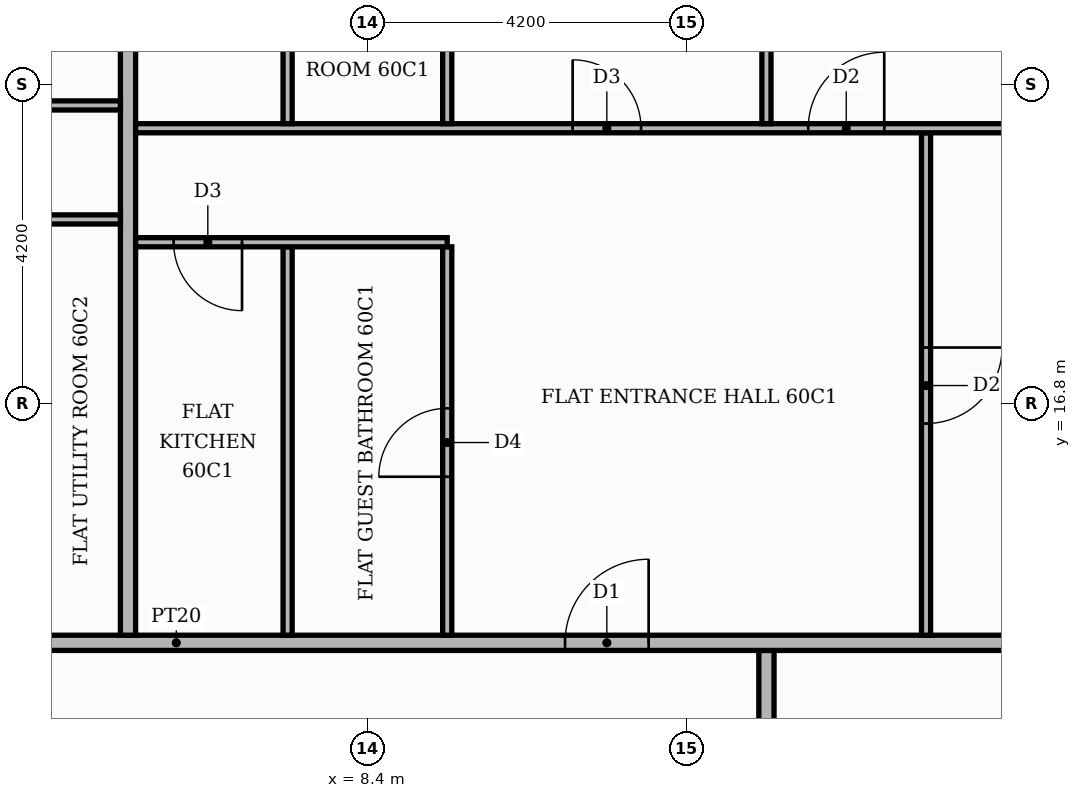
"""IFC4 building model, lengths in metres.
Left out: names, types, materials, properties, quantities, classifications, styles, units other than length and angle.
Written with IfcOpenShell. Run it as: python <this file> out.ifc"""

import sys

from ifc_helpers import new_model, si_unit, direction, frame, frame_2d, origin, place, context, subcontext, project, spatial, rectangle, extrude, element, fill, save


model = new_model("IFC4")
c1 = context("Model", 3, precision=1e-05, world=origin(), true_north=direction((0.0, 1.0)))
c2 = subcontext(c1, "Body", "Model", "MODEL_VIEW")
j1 = project(units=[si_unit("LENGTHUNIT", "METRE"), si_unit("PLANEANGLEUNIT", "RADIAN")], contexts=[c1])
p1 = place(None, origin())
s1 = spatial("IfcSite", under=j1, at=p1, CompositionType="ELEMENT")
p2 = place(p1, origin())
s2 = spatial("IfcBuilding", under=s1, at=p2, CompositionType="ELEMENT")
p3 = place(p2, frame((0.0, 0.0, 252.3)))
s3 = spatial("IfcBuildingStorey", under=s2, at=p3, CompositionType="ELEMENT", Elevation=252.3)
p4 = place(p3, frame((13.65, 11.1, 0.0), z_axis=(0.0, 0.0, 1.0), x_axis=(0.0, 1.0, 0.0)))
e1 = element("IfcWall", 1, at=p4, inside=s3, PredefinedType="PARTITIONING", context=c2, shape_type="SweptSolid", body=[
    extrude(rectangle(XDim=2.45, YDim=0.2, at=frame_2d((1.225, 0.0))), origin(), (0.0, 0.0, 1.0), 3.48),
])
p5 = place(p3, frame((-13.65, 13.65, 0.0), z_axis=(0.0, 0.0, 1.0), x_axis=(1.0, 0.0, 0.0)))
e2 = element("IfcWall", 2, at=p5, inside=s3, PredefinedType="PARTITIONING", context=c2, shape_type="SweptSolid", body=[
    extrude(rectangle(XDim=39.07, YDim=0.2, at=frame_2d((19.535, 0.0))), origin(), (0.0, 0.0, 1.0), 3.48),
])
p6 = place(p5, frame((24.65, 0.0, 0.0)))
e3 = element("IfcOpeningElement", 3, at=p6, cuts=e2, PredefinedType="OPENING", context=c2, shape_type="SweptSolid", body=[
    extrude(rectangle(XDim=1.1, YDim=2.4, at=frame_2d((0.55, 1.2))), frame((0.0, 0.11, 0.0), z_axis=(0.0, -1.0, 0.0), x_axis=(1.0, 0.0, 0.0)), (0.0, 0.0, 1.0), 0.22),
])
p7 = place(p5, frame((14.15, 0.0, 0.0)))
e4 = element("IfcOpeningElement", 4, at=p7, cuts=e2, PredefinedType="OPENING", context=c2, shape_type="SweptSolid", body=[
    extrude(rectangle(XDim=1.1, YDim=2.4, at=frame_2d((0.55, 1.2))), frame((0.0, 0.11, 0.0), z_axis=(0.0, -1.0, 0.0), x_axis=(1.0, 0.0, 0.0)), (0.0, 0.0, 1.0), 0.22),
])
p8 = place(p3, frame((5.25, 13.75, 0.0), z_axis=(0.0, 0.0, 1.0), x_axis=(0.0, 1.0, 0.0)))
e5 = element("IfcWall", 5, at=p8, inside=s3, PredefinedType="PARTITIONING", context=c2, shape_type="SweptSolid", body=[
    extrude(rectangle(XDim=11.67, YDim=0.2, at=frame_2d((5.835, 0.0))), origin(), (0.0, 0.0, 1.0), 3.48),
])
p9 = place(p3, frame((7.35, 13.75, 0.0), z_axis=(0.0, 0.0, 1.0), x_axis=(0.0, 1.0, 0.0)))
e6 = element("IfcWall", 6, at=p9, inside=s3, PredefinedType="PARTITIONING", context=c2, shape_type="SweptSolid", body=[
    extrude(rectangle(XDim=5.11, YDim=0.12, at=frame_2d((2.555, 0.0))), origin(), (0.0, 0.0, 1.0), 3.48),
])
p10 = place(p3, frame((9.45, 13.75, 0.0), z_axis=(0.0, 0.0, 1.0), x_axis=(0.0, 1.0, 0.0)))
e7 = element("IfcWall", 7, at=p10, inside=s3, PredefinedType="PARTITIONING", context=c2, shape_type="SweptSolid", body=[
    extrude(rectangle(XDim=5.11, YDim=0.12, at=frame_2d((2.555, 0.0))), origin(), (0.0, 0.0, 1.0), 3.48),
])
p11 = place(p10, frame((2.085, 0.0, 0.0)))
e8 = element("IfcOpeningElement", 8, at=p11, cuts=e7, PredefinedType="OPENING", context=c2, shape_type="SweptSolid", body=[
    extrude(rectangle(XDim=0.9, YDim=2.1, at=frame_2d((0.45, 1.05))), frame((0.0, 0.07, 0.0), z_axis=(0.0, -1.0, 0.0), x_axis=(1.0, 0.0, 0.0)), (0.0, 0.0, 1.0), 0.14),
])
p12 = place(p3, frame((15.75, 13.75, 0.0), z_axis=(0.0, 0.0, 1.0), x_axis=(0.0, 1.0, 0.0)))
e9 = element("IfcWall", 9, at=p12, inside=s3, PredefinedType="PARTITIONING", context=c2, shape_type="SweptSolid", body=[
    extrude(rectangle(XDim=6.61, YDim=0.12, at=frame_2d((3.305, 0.0))), origin(), (0.0, 0.0, 1.0), 3.48),
])
p13 = place(p12, frame((2.785, 0.0, 0.0)))
e10 = element("IfcOpeningElement", 10, at=p13, cuts=e9, PredefinedType="OPENING", context=c2, shape_type="SweptSolid", body=[
    extrude(rectangle(XDim=1.0, YDim=2.1, at=frame_2d((0.5, 1.05))), frame((0.0, 0.07, 0.0), z_axis=(0.0, -1.0, 0.0), x_axis=(1.0, 0.0, 0.0)), (0.0, 0.0, 1.0), 0.14),
])
p14 = place(p3, frame((5.35, 18.92, 0.0), z_axis=(0.0, 0.0, 1.0), x_axis=(1.0, 0.0, 0.0)))
e11 = element("IfcWall", 11, at=p14, inside=s3, PredefinedType="PARTITIONING", context=c2, shape_type="SweptSolid", body=[
    extrude(rectangle(XDim=4.1, YDim=0.12, at=frame_2d((2.05, 0.0))), origin(), (0.0, 0.0, 1.0), 3.48),
])
p15 = place(p14, frame((0.5, 0.0, 0.0)))
e12 = element("IfcOpeningElement", 12, at=p15, cuts=e11, PredefinedType="OPENING", context=c2, shape_type="SweptSolid", body=[
    extrude(rectangle(XDim=0.9, YDim=2.1, at=frame_2d((0.45, 1.05))), frame((0.0, 0.07, 0.0), z_axis=(0.0, -1.0, 0.0), x_axis=(1.0, 0.0, 0.0)), (0.0, 0.0, 1.0), 0.14),
])
p16 = place(p3, frame((3.15, 19.22, 0.0), z_axis=(0.0, 0.0, 1.0), x_axis=(1.0, 0.0, 0.0)))
e13 = element("IfcWall", 13, at=p16, inside=s3, PredefinedType="PARTITIONING", context=c2, shape_type="SweptSolid", body=[
    extrude(rectangle(XDim=2.0, YDim=0.12, at=frame_2d((1.0, 0.0))), origin(), (0.0, 0.0, 1.0), 3.48),
])
p17 = place(p3, frame((5.35, 20.42, 0.0), z_axis=(0.0, 0.0, 1.0), x_axis=(1.0, 0.0, 0.0)))
e14 = element("IfcWall", 14, at=p17, inside=s3, PredefinedType="PARTITIONING", context=c2, shape_type="SweptSolid", body=[
    extrude(rectangle(XDim=15.369, YDim=0.12, at=frame_2d((7.685, 0.0))), origin(), (0.0, 0.0, 1.0), 3.48),
])
p18 = place(p17, frame((8.85, 0.0, 0.0)))
e15 = element("IfcOpeningElement", 15, at=p18, cuts=e14, PredefinedType="OPENING", context=c2, shape_type="SweptSolid", body=[
    extrude(rectangle(XDim=1.0, YDim=2.1, at=frame_2d((0.5, 1.05))), frame((0.0, 0.07, 0.0), z_axis=(0.0, -1.0, 0.0), x_axis=(1.0, 0.0, 0.0)), (0.0, 0.0, 1.0), 0.14),
])
p19 = place(p17, frame((5.75, 0.0, 0.0)))
e16 = element("IfcOpeningElement", 16, at=p19, cuts=e14, PredefinedType="OPENING", context=c2, shape_type="SweptSolid", body=[
    extrude(rectangle(XDim=0.9, YDim=2.1, at=frame_2d((0.45, 1.05))), frame((0.0, 0.07, 0.0), z_axis=(0.0, -1.0, 0.0), x_axis=(1.0, 0.0, 0.0)), (0.0, 0.0, 1.0), 0.14),
])
p20 = place(p3, frame((7.35, 20.48, 0.0), z_axis=(0.0, 0.0, 1.0), x_axis=(0.0, 1.0, 0.0)))
e17 = element("IfcWall", 17, at=p20, inside=s3, PredefinedType="PARTITIONING", context=c2, shape_type="SweptSolid", body=[
    extrude(rectangle(XDim=4.94, YDim=0.12, at=frame_2d((2.47, 0.0))), origin(), (0.0, 0.0, 1.0), 3.48),
])
p21 = place(p20, frame((2.14, 0.0, 0.0)))
e18 = element("IfcOpeningElement", 18, at=p21, cuts=e17, PredefinedType="OPENING", context=c2, shape_type="SweptSolid", body=[
    extrude(rectangle(XDim=0.9, YDim=2.1, at=frame_2d((0.45, 1.05))), frame((0.0, 0.07, 0.0), z_axis=(0.0, -1.0, 0.0), x_axis=(1.0, 0.0, 0.0)), (0.0, 0.0, 1.0), 0.14),
])
p22 = place(p3, frame((9.45, 20.48, 0.0), z_axis=(0.0, 0.0, 1.0), x_axis=(0.0, 1.0, 0.0)))
e19 = element("IfcWall", 19, at=p22, inside=s3, PredefinedType="PARTITIONING", context=c2, shape_type="SweptSolid", body=[
    extrude(rectangle(XDim=4.94, YDim=0.12, at=frame_2d((2.47, 0.0))), origin(), (0.0, 0.0, 1.0), 3.48),
])
p23 = place(p22, frame((2.14, 0.0, 0.0)))
e20 = element("IfcOpeningElement", 20, at=p23, cuts=e19, PredefinedType="OPENING", context=c2, shape_type="SweptSolid", body=[
    extrude(rectangle(XDim=0.9, YDim=2.1, at=frame_2d((0.45, 1.05))), frame((0.0, 0.07, 0.0), z_axis=(0.0, -1.0, 0.0), x_axis=(1.0, 0.0, 0.0)), (0.0, 0.0, 1.0), 0.14),
])
p24 = place(p3, frame((13.65, 20.48, 0.0), z_axis=(0.0, 0.0, 1.0), x_axis=(0.0, 1.0, 0.0)))
e21 = element("IfcWall", 21, at=p24, inside=s3, PredefinedType="PARTITIONING", context=c2, shape_type="SweptSolid", body=[
    extrude(rectangle(XDim=4.94, YDim=0.12, at=frame_2d((2.47, 0.0))), origin(), (0.0, 0.0, 1.0), 3.48),
])
p25 = place(p3, frame((-13.55, 20.72, 0.0), z_axis=(0.0, 0.0, 1.0), x_axis=(1.0, 0.0, 0.0)))
e22 = element("IfcWall", 22, at=p25, inside=s3, PredefinedType="PARTITIONING", context=c2, shape_type="SweptSolid", body=[
    extrude(rectangle(XDim=18.7, YDim=0.12, at=frame_2d((9.35, 0.0))), origin(), (0.0, 0.0, 1.0), 3.48),
])
p26 = place(p25, frame((16.2, 0.0, 0.0)))
e23 = element("IfcOpeningElement", 23, at=p26, cuts=e22, PredefinedType="OPENING", context=c2, shape_type="SweptSolid", body=[
    extrude(rectangle(XDim=1.0, YDim=2.1, at=frame_2d((0.5, 1.05))), frame((0.0, 0.07, 0.0), z_axis=(0.0, -1.0, 0.0), x_axis=(1.0, 0.0, 0.0)), (0.0, 0.0, 1.0), 0.14),
])
p27 = place(p25, frame((12.05, 0.0, 0.0)))
e24 = element("IfcOpeningElement", 24, at=p27, cuts=e22, PredefinedType="OPENING", context=c2, shape_type="SweptSolid", body=[
    extrude(rectangle(XDim=0.9, YDim=2.1, at=frame_2d((0.45, 1.05))), frame((0.0, 0.07, 0.0), z_axis=(0.0, -1.0, 0.0), x_axis=(1.0, 0.0, 0.0)), (0.0, 0.0, 1.0), 0.14),
])
p28 = place(p25, frame((3.65, 0.0, 0.0)))
e25 = element("IfcOpeningElement", 25, at=p28, cuts=e22, PredefinedType="OPENING", context=c2, shape_type="SweptSolid", body=[
    extrude(rectangle(XDim=0.9, YDim=2.1, at=frame_2d((0.45, 1.05))), frame((0.0, 0.07, 0.0), z_axis=(0.0, -1.0, 0.0), x_axis=(1.0, 0.0, 0.0)), (0.0, 0.0, 1.0), 0.14),
])
p29 = place(p6, origin())
e26 = element("IfcDoor", 26, at=p29, inside=s3, OperationType="SINGLE_SWING_RIGHT", PredefinedType="DOOR", context=c2, shape_type="SweptSolid", body=[
    extrude(rectangle(XDim=1.1, YDim=2.4, at=frame_2d((0.55, 1.2))), frame((0.0, 0.025, 0.0), z_axis=(0.0, -1.0, 0.0), x_axis=(1.0, 0.0, 0.0)), (0.0, 0.0, 1.0), 0.05),
])
fill(e3, e26)
p30 = place(p13, frame((1.0, 0.0, 0.0), z_axis=(0.0, 0.0, 1.0), x_axis=(-1.0, 0.0, 0.0)))
e27 = element("IfcDoor", 27, at=p30, inside=s3, OperationType="SINGLE_SWING_RIGHT", PredefinedType="DOOR", context=c2, shape_type="SweptSolid", body=[
    extrude(rectangle(XDim=1.0, YDim=2.1, at=frame_2d((0.5, 1.05))), frame((0.0, 0.025, 0.0), z_axis=(0.0, -1.0, 0.0), x_axis=(1.0, 0.0, 0.0)), (0.0, 0.0, 1.0), 0.05),
])
fill(e10, e27)
p31 = place(p11, origin())
e28 = element("IfcDoor", 28, at=p31, inside=s3, OperationType="SINGLE_SWING_LEFT", PredefinedType="DOOR", context=c2, shape_type="SweptSolid", body=[
    extrude(rectangle(XDim=0.9, YDim=2.1, at=frame_2d((0.45, 1.05))), frame((0.0, 0.025, 0.0), z_axis=(0.0, -1.0, 0.0), x_axis=(1.0, 0.0, 0.0)), (0.0, 0.0, 1.0), 0.05),
])
fill(e8, e28)
p32 = place(p15, frame((0.9, 0.0, 0.0), z_axis=(0.0, 0.0, 1.0), x_axis=(-1.0, 0.0, 0.0)))
e29 = element("IfcDoor", 29, at=p32, inside=s3, OperationType="SINGLE_SWING_RIGHT", PredefinedType="DOOR", context=c2, shape_type="SweptSolid", body=[
    extrude(rectangle(XDim=0.9, YDim=2.1, at=frame_2d((0.45, 1.05))), frame((0.0, 0.025, 0.0), z_axis=(0.0, -1.0, 0.0), x_axis=(1.0, 0.0, 0.0)), (0.0, 0.0, 1.0), 0.05),
])
fill(e12, e29)
p33 = place(p18, origin())
e30 = element("IfcDoor", 30, at=p33, inside=s3, OperationType="SINGLE_SWING_RIGHT", PredefinedType="DOOR", context=c2, shape_type="SweptSolid", body=[
    extrude(rectangle(XDim=1.0, YDim=2.1, at=frame_2d((0.5, 1.05))), frame((0.0, 0.025, 0.0), z_axis=(0.0, -1.0, 0.0), x_axis=(1.0, 0.0, 0.0)), (0.0, 0.0, 1.0), 0.05),
])
fill(e15, e30)
p34 = place(p19, origin())
e31 = element("IfcDoor", 31, at=p34, inside=s3, OperationType="SINGLE_SWING_LEFT", PredefinedType="DOOR", context=c2, shape_type="SweptSolid", body=[
    extrude(rectangle(XDim=0.9, YDim=2.1, at=frame_2d((0.45, 1.05))), frame((0.0, 0.025, 0.0), z_axis=(0.0, -1.0, 0.0), x_axis=(1.0, 0.0, 0.0)), (0.0, 0.0, 1.0), 0.05),
])
fill(e16, e31)
save(model, sys.argv[1])
